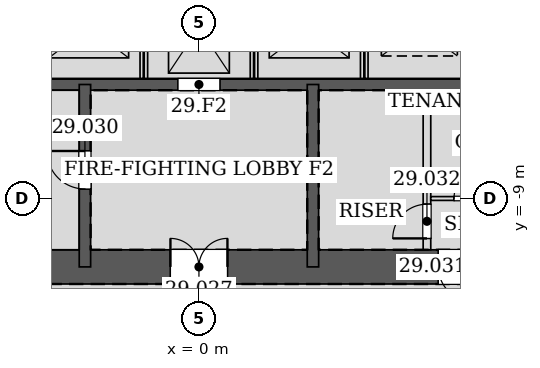
"""IFC4 building model, lengths in metres.
Left out: names, types, materials, properties, quantities, classifications, styles, units other than length and angle.
Written with IfcOpenShell. Run it as: python <this file> out.ifc"""

import sys

from ifc_helpers import new_model, si_unit, direction, frame, frame_2d, origin, place, context, subcontext, project, spatial, rectangle, extrude, element, fill, save


model = new_model("IFC4")
c1 = context("Model", 3, precision=1e-05, world=origin(), true_north=direction((0.0, 1.0)))
c2 = subcontext(c1, "Body", "Model", "MODEL_VIEW")
j1 = project(units=[si_unit("LENGTHUNIT", "METRE"), si_unit("PLANEANGLEUNIT", "RADIAN")], contexts=[c1])
p1 = place(None, origin())
s1 = spatial("IfcSite", under=j1, at=p1, CompositionType="ELEMENT")
p2 = place(p1, origin())
s2 = spatial("IfcBuilding", under=s1, at=p2, CompositionType="ELEMENT")
p3 = place(p2, frame((0.0, 0.0, 130.2)))
s3 = spatial("IfcBuildingStorey", under=s2, at=p3, CompositionType="ELEMENT", Elevation=130.2)
p4 = place(p3, frame((-10.8, -10.8, 0.0), z_axis=(0.0, 0.0, 1.0), x_axis=(1.0, 0.0, 0.0)))
e1 = element("IfcWall", 1, at=p4, inside=s3, PredefinedType="SOLIDWALL", context=c2, shape_type="SweptSolid", body=[
    extrude(rectangle(XDim=21.6, YDim=0.9, at=frame_2d((10.8, 0.0))), origin(), (0.0, 0.0, 1.0), 4.2),
])
p5 = place(p4, frame((10.05, 0.0, 0.0)))
e2 = element("IfcOpeningElement", 2, at=p5, cuts=e1, PredefinedType="OPENING", context=c2, shape_type="SweptSolid", body=[
    extrude(rectangle(XDim=1.5, YDim=2.1, at=frame_2d((0.75, 1.05))), frame((0.0, 0.46, 0.0), z_axis=(0.0, -1.0, 0.0), x_axis=(1.0, 0.0, 0.0)), (0.0, 0.0, 1.0), 0.92),
])
p6 = place(p4, frame((17.1, 0.0, 0.0)))
e3 = element("IfcOpeningElement", 3, at=p6, cuts=e1, PredefinedType="OPENING", context=c2, shape_type="SweptSolid", body=[
    extrude(rectangle(XDim=0.9, YDim=2.1, at=frame_2d((0.45, 1.05))), frame((0.0, 0.46, 0.0), z_axis=(0.0, -1.0, 0.0), x_axis=(1.0, 0.0, 0.0)), (0.0, 0.0, 1.0), 0.92),
])
p7 = place(p3, frame((-10.8, -6.0, 0.0), z_axis=(0.0, 0.0, 1.0), x_axis=(1.0, 0.0, 0.0)))
e4 = element("IfcWall", 4, at=p7, inside=s3, PredefinedType="SOLIDWALL", context=c2, shape_type="SweptSolid", body=[
    extrude(rectangle(XDim=21.6, YDim=0.3, at=frame_2d((10.8, 0.0))), origin(), (0.0, 0.0, 1.0), 4.2),
])
p8 = place(p7, frame((10.25, 0.0, 0.0)))
e5 = element("IfcOpeningElement", 5, at=p8, cuts=e4, PredefinedType="OPENING", context=c2, shape_type="SweptSolid", body=[
    extrude(rectangle(XDim=1.1, YDim=2.1, at=frame_2d((0.55, 1.05))), frame((0.0, 0.16, 0.0), z_axis=(0.0, -1.0, 0.0), x_axis=(1.0, 0.0, 0.0)), (0.0, 0.0, 1.0), 0.32),
])
p9 = place(p3, frame((-3.0, -6.0, 0.0), z_axis=(0.0, 0.0, 1.0), x_axis=(0.0, -1.0, 0.0)))
e6 = element("IfcWall", 6, at=p9, inside=s3, PredefinedType="SOLIDWALL", context=c2, shape_type="SweptSolid", body=[
    extrude(rectangle(XDim=4.8, YDim=0.3, at=frame_2d((2.4, 0.0))), origin(), (0.0, 0.0, 1.0), 4.2),
])
p10 = place(p9, frame((1.75, 0.0, 0.0)))
e7 = element("IfcOpeningElement", 7, at=p10, cuts=e6, PredefinedType="OPENING", context=c2, shape_type="SweptSolid", body=[
    extrude(rectangle(XDim=1.0, YDim=2.1, at=frame_2d((0.5, 1.05))), frame((0.0, 0.16, 0.0), z_axis=(0.0, -1.0, 0.0), x_axis=(1.0, 0.0, 0.0)), (0.0, 0.0, 1.0), 0.32),
])
p11 = place(p3, frame((3.0, -6.0, 0.0), z_axis=(0.0, 0.0, 1.0), x_axis=(0.0, -1.0, 0.0)))
e8 = element("IfcWall", 8, at=p11, inside=s3, PredefinedType="SOLIDWALL", context=c2, shape_type="SweptSolid", body=[
    extrude(rectangle(XDim=4.8, YDim=0.3, at=frame_2d((2.4, 0.0))), origin(), (0.0, 0.0, 1.0), 4.2),
])
for number, where, z_axis, x_axis in (
    (9, (-1.45, -5.85, 0.0), (0.0, 0.0, 1.0), (0.0, 1.0, 0.0)),
    (10, (1.45, -5.85, 0.0), (0.0, 0.0, 1.0), (0.0, 1.0, 0.0)),
    (11, (4.35, -5.85, 0.0), (0.0, 0.0, 1.0), (0.0, 1.0, 0.0)),
):
    element("IfcWall", number, at=place(p3, frame(where, z_axis=z_axis, x_axis=x_axis)), inside=s3, PredefinedType="PARTITIONING", context=c2, shape_type="SweptSolid", body=[
        extrude(rectangle(XDim=2.7, YDim=0.2, at=frame_2d((1.35, 0.0))), origin(), (0.0, 0.0, 1.0), 4.2),
    ])
p12 = place(p3, frame((6.0, -10.35, 0.0), z_axis=(0.0, 0.0, 1.0), x_axis=(0.0, 1.0, 0.0)))
e12 = element("IfcWall", 12, at=p12, inside=s3, PredefinedType="PARTITIONING", context=c2, shape_type="SweptSolid", body=[
    extrude(rectangle(XDim=4.2, YDim=0.2, at=frame_2d((2.1, 0.0))), origin(), (0.0, 0.0, 1.0), 4.035),
])
p13 = place(p12, frame((0.3, 0.0, 0.0)))
e13 = element("IfcOpeningElement", 13, at=p13, cuts=e12, PredefinedType="OPENING", context=c2, shape_type="SweptSolid", body=[
    extrude(rectangle(XDim=0.9, YDim=2.1, at=frame_2d((0.45, 1.05))), frame((0.0, 0.11, 0.0), z_axis=(0.0, -1.0, 0.0), x_axis=(1.0, 0.0, 0.0)), (0.0, 0.0, 1.0), 0.22),
])
p14 = place(p3, frame((6.1, -9.0, 0.0), z_axis=(0.0, 0.0, 1.0), x_axis=(1.0, 0.0, 0.0)))
e14 = element("IfcWall", 14, at=p14, inside=s3, PredefinedType="PARTITIONING", context=c2, shape_type="SweptSolid", body=[
    extrude(rectangle(XDim=4.25, YDim=0.1, at=frame_2d((2.125, 0.0))), origin(), (0.0, 0.0, 1.0), 4.035),
])
p15 = place(p14, frame((0.613, 0.0, 0.0)))
e15 = element("IfcOpeningElement", 15, at=p15, cuts=e14, PredefinedType="OPENING", context=c2, shape_type="SweptSolid", body=[
    extrude(rectangle(XDim=0.9, YDim=2.1, at=frame_2d((0.45, 1.05))), frame((0.0, 0.06, 0.0), z_axis=(0.0, -1.0, 0.0), x_axis=(1.0, 0.0, 0.0)), (0.0, 0.0, 1.0), 0.12),
])
p16 = place(p14, frame((2.738, 0.0, 0.0)))
e16 = element("IfcOpeningElement", 16, at=p16, cuts=e14, PredefinedType="OPENING", context=c2, shape_type="SweptSolid", body=[
    extrude(rectangle(XDim=0.9, YDim=2.1, at=frame_2d((0.45, 1.05))), frame((0.0, 0.06, 0.0), z_axis=(0.0, -1.0, 0.0), x_axis=(1.0, 0.0, 0.0)), (0.0, 0.0, 1.0), 0.12),
])
p17 = place(p5, origin())
e17 = element("IfcDoor", 17, at=p17, inside=s3, OperationType="DOUBLE_DOOR_SINGLE_SWING", PredefinedType="DOOR", context=c2, shape_type="SweptSolid", body=[
    extrude(rectangle(XDim=1.5, YDim=2.1, at=frame_2d((0.75, 1.05))), frame((0.0, 0.025, 0.0), z_axis=(0.0, -1.0, 0.0), x_axis=(1.0, 0.0, 0.0)), (0.0, 0.0, 1.0), 0.05),
])
fill(e2, e17)
p18 = place(p10, frame((1.0, 0.0, 0.0), z_axis=(0.0, 0.0, 1.0), x_axis=(-1.0, 0.0, 0.0)))
e18 = element("IfcDoor", 18, at=p18, inside=s3, OperationType="SINGLE_SWING_RIGHT", PredefinedType="DOOR", context=c2, shape_type="SweptSolid", body=[
    extrude(rectangle(XDim=1.0, YDim=2.1, at=frame_2d((0.5, 1.05))), frame((0.0, 0.025, 0.0), z_axis=(0.0, -1.0, 0.0), x_axis=(1.0, 0.0, 0.0)), (0.0, 0.0, 1.0), 0.05),
])
fill(e7, e18)
p19 = place(p6, frame((0.9, 0.0, 0.0), z_axis=(0.0, 0.0, 1.0), x_axis=(-1.0, 0.0, 0.0)))
e19 = element("IfcDoor", 19, at=p19, inside=s3, OperationType="SINGLE_SWING_LEFT", PredefinedType="DOOR", context=c2, shape_type="SweptSolid", body=[
    extrude(rectangle(XDim=0.9, YDim=2.1, at=frame_2d((0.45, 1.05))), frame((0.0, 0.025, 0.0), z_axis=(0.0, -1.0, 0.0), x_axis=(1.0, 0.0, 0.0)), (0.0, 0.0, 1.0), 0.05),
])
fill(e3, e19)
p20 = place(p13, origin())
e20 = element("IfcDoor", 20, at=p20, inside=s3, OperationType="SINGLE_SWING_LEFT", PredefinedType="DOOR", context=c2, shape_type="SweptSolid", body=[
    extrude(rectangle(XDim=0.9, YDim=2.1, at=frame_2d((0.45, 1.05))), frame((0.0, 0.025, 0.0), z_axis=(0.0, -1.0, 0.0), x_axis=(1.0, 0.0, 0.0)), (0.0, 0.0, 1.0), 0.05),
])
fill(e13, e20)
p21 = place(p15, origin())
e21 = element("IfcDoor", 21, at=p21, inside=s3, OperationType="SINGLE_SWING_RIGHT", PredefinedType="DOOR", context=c2, shape_type="SweptSolid", body=[
    extrude(rectangle(XDim=0.9, YDim=2.1, at=frame_2d((0.45, 1.05))), frame((0.0, 0.025, 0.0), z_axis=(0.0, -1.0, 0.0), x_axis=(1.0, 0.0, 0.0)), (0.0, 0.0, 1.0), 0.05),
])
fill(e15, e21)
p22 = place(p8, origin())
e22 = element("IfcDoor", 22, at=p22, inside=s3, OperationType="DOUBLE_DOOR_SLIDING", PredefinedType="DOOR", context=c2, shape_type="SweptSolid", body=[
    extrude(rectangle(XDim=1.1, YDim=2.1, at=frame_2d((0.55, 1.05))), frame((0.0, 0.025, 0.0), z_axis=(0.0, -1.0, 0.0), x_axis=(1.0, 0.0, 0.0)), (0.0, 0.0, 1.0), 0.05),
])
fill(e5, e22)
save(model, sys.argv[1])
